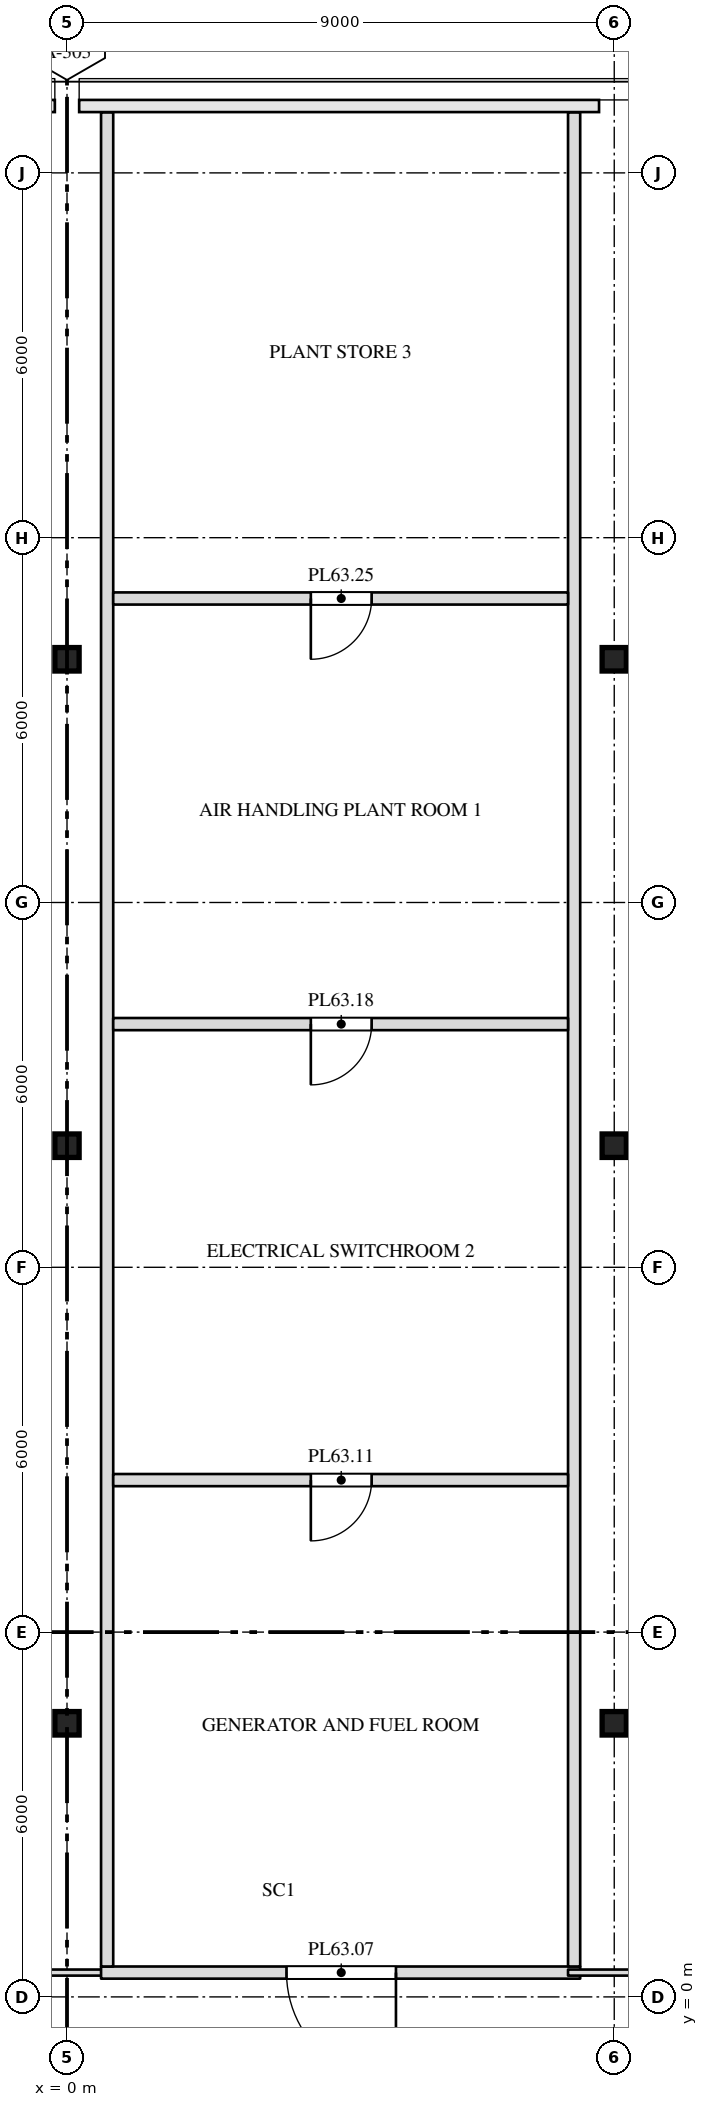
"""IFC4 building model, lengths in metres.
Left out: names, types, materials, properties, quantities, classifications, styles, units other than length and angle.
Written with IfcOpenShell. Run it as: python <this file> out.ifc"""

import sys

from ifc_helpers import new_model, si_unit, direction, frame, frame_2d, origin, origin_2d, place, context, subcontext, project, spatial, rectangle, i_section, extrude, element, fill, save


model = new_model("IFC4")
c1 = context("Model", 3, precision=1e-05, world=origin(), true_north=direction((0.0, 1.0)))
c2 = subcontext(c1, "Body", "Model", "MODEL_VIEW")
j1 = project(units=[si_unit("LENGTHUNIT", "METRE"), si_unit("PLANEANGLEUNIT", "RADIAN")], contexts=[c1])
p1 = place(None, origin())
s1 = spatial("IfcSite", under=j1, at=p1, CompositionType="ELEMENT")
p2 = place(p1, origin())
s2 = spatial("IfcBuilding", under=s1, at=p2, CompositionType="ELEMENT")
p3 = place(p2, frame((0.0, 0.0, 268.5)))
s3 = spatial("IfcBuildingStorey", under=s2, at=p3, CompositionType="ELEMENT", Elevation=268.5)
for number, where, z_axis, x_axis in (
    (1, (0.0, 4.5, 0.0), (0.0, 0.0, 1.0), (1.0, 0.0, 0.0)),
    (2, (9.0, 4.5, 0.0), (0.0, 0.0, 1.0), (1.0, 0.0, 0.0)),
    (3, (0.0, 14.0, 0.0), (0.0, 0.0, 1.0), (1.0, 0.0, 0.0)),
    (4, (9.0, 14.0, 0.0), (0.0, 0.0, 1.0), (1.0, 0.0, 0.0)),
    (5, (0.0, 22.0, 0.0), (0.0, 0.0, 1.0), (1.0, 0.0, 0.0)),
    (6, (9.0, 22.0, 0.0), (0.0, 0.0, 1.0), (1.0, 0.0, 0.0)),
):
    element("IfcColumn", number, at=place(p3, frame(where, z_axis=z_axis, x_axis=x_axis)), inside=s3, PredefinedType="COLUMN", context=c2, shape_type="SweptSolid", body=[
        extrude(i_section(OverallWidth=0.399, OverallDepth=0.386, WebThickness=0.021, FlangeThickness=0.033, at=origin_2d()), origin(), (0.0, 0.0, 1.0), 4.0),
    ])
p4 = place(p3, frame((-0.735, 0.4, 0.0), z_axis=(0.0, 0.0, 1.0), x_axis=(1.0, 0.0, 0.0)))
e7 = element("IfcWall", 7, at=p4, inside=s3, PredefinedType="PARTITIONING", context=c2, shape_type="SweptSolid", body=[
    extrude(rectangle(XDim=1.495, YDim=0.1, at=frame_2d((0.748, 0.0))), origin(), (0.0, 0.0, 1.0), 3.78),
])
p5 = place(p3, frame((0.56, 0.4, 0.0), z_axis=(0.0, 0.0, 1.0), x_axis=(1.0, 0.0, 0.0)))
e8 = element("IfcWall", 8, at=p5, inside=s3, PredefinedType="PARTITIONING", context=c2, shape_type="SweptSolid", body=[
    extrude(rectangle(XDim=7.88, YDim=0.2, at=frame_2d((3.94, 0.0))), origin(), (0.0, 0.0, 1.0), 3.78),
])
p6 = place(p5, frame((3.05, 0.0, 0.0)))
e9 = element("IfcOpeningElement", 9, at=p6, cuts=e8, PredefinedType="OPENING", context=c2, shape_type="SweptSolid", body=[
    extrude(rectangle(XDim=1.8, YDim=2.1, at=frame_2d((0.9, 1.05))), frame((0.0, 0.112, 0.0), z_axis=(0.0, -1.0, 0.0), x_axis=(1.0, 0.0, 0.0)), (0.0, 0.0, 1.0), 0.224),
])
p7 = place(p3, frame((0.66, 0.5, 0.0), z_axis=(0.0, 0.0, 1.0), x_axis=(0.0, 1.0, 0.0)))
e10 = element("IfcWall", 10, at=p7, inside=s3, PredefinedType="PARTITIONING", context=c2, shape_type="SweptSolid", body=[
    extrude(rectangle(XDim=30.496, YDim=0.2, at=frame_2d((15.248, 0.0))), origin(), (0.0, 0.0, 1.0), 3.78),
])
p8 = place(p3, frame((8.24, 0.4, 0.0), z_axis=(0.0, 0.0, 1.0), x_axis=(1.0, 0.0, 0.0)))
e11 = element("IfcWall", 11, at=p8, inside=s3, PredefinedType="PARTITIONING", context=c2, shape_type="SweptSolid", body=[
    extrude(rectangle(XDim=1.52, YDim=0.1, at=frame_2d((0.76, 0.0))), origin(), (0.0, 0.0, 1.0), 3.78),
])
p9 = place(p3, frame((8.34, 0.5, 0.0), z_axis=(0.0, 0.0, 1.0), x_axis=(0.0, 1.0, 0.0)))
e12 = element("IfcWall", 12, at=p9, inside=s3, PredefinedType="PARTITIONING", context=c2, shape_type="SweptSolid", body=[
    extrude(rectangle(XDim=30.496, YDim=0.2, at=frame_2d((15.248, 0.0))), origin(), (0.0, 0.0, 1.0), 3.78),
])
p10 = place(p3, frame((0.76, 8.5, 0.0), z_axis=(0.0, 0.0, 1.0), x_axis=(1.0, 0.0, 0.0)))
e13 = element("IfcWall", 13, at=p10, inside=s3, PredefinedType="PARTITIONING", context=c2, shape_type="SweptSolid", body=[
    extrude(rectangle(XDim=7.48, YDim=0.2, at=frame_2d((3.74, 0.0))), origin(), (0.0, 0.0, 1.0), 3.78),
])
p11 = place(p10, frame((3.25, 0.0, 0.0)))
e14 = element("IfcOpeningElement", 14, at=p11, cuts=e13, PredefinedType="OPENING", context=c2, shape_type="SweptSolid", body=[
    extrude(rectangle(XDim=1.0, YDim=2.1, at=frame_2d((0.5, 1.05))), frame((0.0, 0.112, 0.0), z_axis=(0.0, -1.0, 0.0), x_axis=(1.0, 0.0, 0.0)), (0.0, 0.0, 1.0), 0.224),
])
p12 = place(p3, frame((0.76, 16.0, 0.0), z_axis=(0.0, 0.0, 1.0), x_axis=(1.0, 0.0, 0.0)))
e15 = element("IfcWall", 15, at=p12, inside=s3, PredefinedType="PARTITIONING", context=c2, shape_type="SweptSolid", body=[
    extrude(rectangle(XDim=7.48, YDim=0.2, at=frame_2d((3.74, 0.0))), origin(), (0.0, 0.0, 1.0), 3.78),
])
p13 = place(p12, frame((3.25, 0.0, 0.0)))
e16 = element("IfcOpeningElement", 16, at=p13, cuts=e15, PredefinedType="OPENING", context=c2, shape_type="SweptSolid", body=[
    extrude(rectangle(XDim=1.0, YDim=2.1, at=frame_2d((0.5, 1.05))), frame((0.0, 0.112, 0.0), z_axis=(0.0, -1.0, 0.0), x_axis=(1.0, 0.0, 0.0)), (0.0, 0.0, 1.0), 0.224),
])
p14 = place(p3, frame((0.76, 23.0, 0.0), z_axis=(0.0, 0.0, 1.0), x_axis=(1.0, 0.0, 0.0)))
e17 = element("IfcWall", 17, at=p14, inside=s3, PredefinedType="PARTITIONING", context=c2, shape_type="SweptSolid", body=[
    extrude(rectangle(XDim=7.48, YDim=0.2, at=frame_2d((3.74, 0.0))), origin(), (0.0, 0.0, 1.0), 3.78),
])
p15 = place(p14, frame((3.25, 0.0, 0.0)))
e18 = element("IfcOpeningElement", 18, at=p15, cuts=e17, PredefinedType="OPENING", context=c2, shape_type="SweptSolid", body=[
    extrude(rectangle(XDim=1.0, YDim=2.1, at=frame_2d((0.5, 1.05))), frame((0.0, 0.112, 0.0), z_axis=(0.0, -1.0, 0.0), x_axis=(1.0, 0.0, 0.0)), (0.0, 0.0, 1.0), 0.224),
])
p16 = place(p6, origin())
e19 = element("IfcDoor", 19, at=p16, inside=s3, OperationType="DOUBLE_DOOR_SINGLE_SWING", PredefinedType="DOOR", context=c2, shape_type="SweptSolid", body=[
    extrude(rectangle(XDim=1.8, YDim=2.1, at=frame_2d((0.9, 1.05))), frame((0.0, 0.025, 0.0), z_axis=(0.0, -1.0, 0.0), x_axis=(1.0, 0.0, 0.0)), (0.0, 0.0, 1.0), 0.05),
])
fill(e9, e19)
p17 = place(p11, origin())
e20 = element("IfcDoor", 20, at=p17, inside=s3, OperationType="SINGLE_SWING_RIGHT", PredefinedType="DOOR", context=c2, shape_type="SweptSolid", body=[
    extrude(rectangle(XDim=1.0, YDim=2.1, at=frame_2d((0.5, 1.05))), frame((0.0, 0.025, 0.0), z_axis=(0.0, -1.0, 0.0), x_axis=(1.0, 0.0, 0.0)), (0.0, 0.0, 1.0), 0.05),
])
fill(e14, e20)
p18 = place(p13, origin())
e21 = element("IfcDoor", 21, at=p18, inside=s3, OperationType="SINGLE_SWING_RIGHT", PredefinedType="DOOR", context=c2, shape_type="SweptSolid", body=[
    extrude(rectangle(XDim=1.0, YDim=2.1, at=frame_2d((0.5, 1.05))), frame((0.0, 0.025, 0.0), z_axis=(0.0, -1.0, 0.0), x_axis=(1.0, 0.0, 0.0)), (0.0, 0.0, 1.0), 0.05),
])
fill(e16, e21)
p19 = place(p15, origin())
e22 = element("IfcDoor", 22, at=p19, inside=s3, OperationType="SINGLE_SWING_RIGHT", PredefinedType="DOOR", context=c2, shape_type="SweptSolid", body=[
    extrude(rectangle(XDim=1.0, YDim=2.1, at=frame_2d((0.5, 1.05))), frame((0.0, 0.025, 0.0), z_axis=(0.0, -1.0, 0.0), x_axis=(1.0, 0.0, 0.0)), (0.0, 0.0, 1.0), 0.05),
])
fill(e18, e22)
save(model, sys.argv[1])
